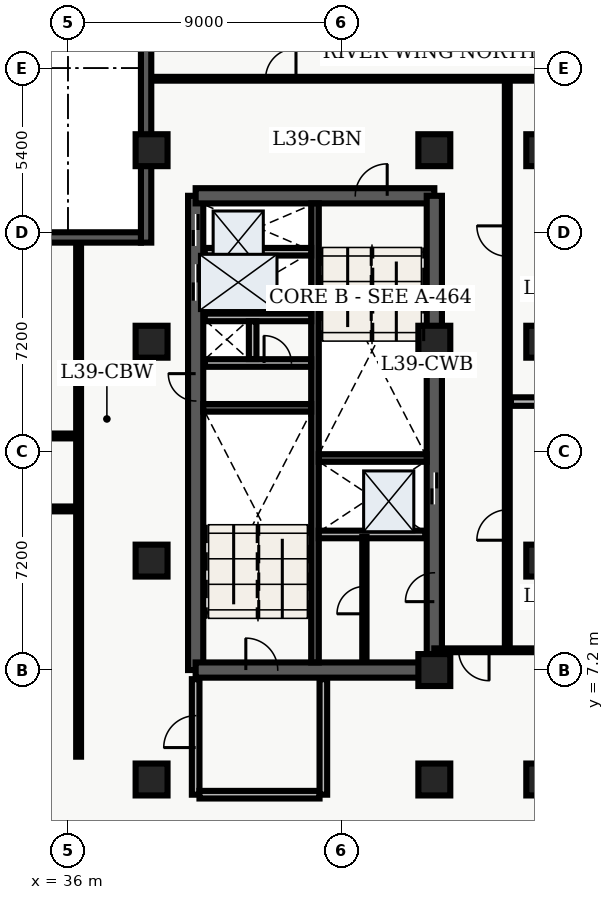
"""IFC4 building model, lengths in metres.
Left out: names, types, materials, properties, quantities, classifications, styles, units other than length and angle.
Written with IfcOpenShell. Run it as: python <this file> out.ifc"""

import sys

from ifc_helpers import new_model, entity, si_unit, converted_unit, direction, frame, origin_with_axes, origin_2d_with_axis, place, context, subcontext, project, spatial, polyline, rectangle, outline, extrude, element, fill, save


model = new_model("IFC4")
c1 = context("Model", 3, precision=1e-05, world=origin_with_axes(), true_north=direction((0.0, 1.0)))
c2 = subcontext(c1, "Body", "Model", "MODEL_VIEW")
j1 = project(units=[si_unit("LENGTHUNIT", "METRE"), converted_unit("PLANEANGLEUNIT", "DEGREE", entity("IfcPlaneAngleMeasure", 0.017), si_unit("PLANEANGLEUNIT", "RADIAN"), dimensions=[0, 0, 0, 0, 0, 0, 0])], contexts=[c1])
p1 = place(None, origin_with_axes())
s1 = spatial("IfcSite", under=j1, at=p1, CompositionType="ELEMENT")
p2 = place(p1, origin_with_axes())
s2 = spatial("IfcBuilding", under=s1, at=p2, CompositionType="ELEMENT")
p3 = place(p2, frame((0.0, 0.0, 160.2), z_axis=(0.0, 0.0, 1.0), x_axis=(1.0, 0.0, 0.0)))
s3 = spatial("IfcBuildingStorey", under=s2, at=p3, CompositionType="ELEMENT", Elevation=160.2)
p4 = place(p3, frame((40.2, 7.2, 0.0), z_axis=(0.0, 0.0, 1.0), x_axis=(0.0, 1.0, 0.0)))
e1 = element("IfcWall", 1, at=p4, inside=s3, PredefinedType="SHEAR", context=c2, shape_type="SweptSolid", body=[
    extrude(outline(polyline([(0.0, -0.25), (15.6, -0.25), (15.6, 0.25), (0.0, 0.25), (0.0, -0.25)])), origin_with_axes(), (0.0, 0.0, 1.0), 3.66),
])
p5 = place(p4, frame((14.475, 0.0, 0.0), z_axis=(0.0, 0.0, 1.0), x_axis=(1.0, 0.0, 0.0)))
e2 = element("IfcOpeningElement", 2, at=p5, cuts=e1, PredefinedType="OPENING", context=c2, shape_type="SweptSolid", body=[
    extrude(rectangle(XDim=1.05, YDim=0.52, at=origin_2d_with_axis()), origin_with_axes(), (0.0, 0.0, 1.0), 2.15),
])
p6 = place(p4, frame((12.75, 0.0, 0.0), z_axis=(0.0, 0.0, 1.0), x_axis=(1.0, 0.0, 0.0)))
e3 = element("IfcOpeningElement", 3, at=p6, cuts=e1, PredefinedType="OPENING", context=c2, shape_type="SweptSolid", body=[
    extrude(rectangle(XDim=1.2, YDim=0.52, at=origin_2d_with_axis()), origin_with_axes(), (0.0, 0.0, 1.0), 2.15),
])
p7 = place(p4, frame((9.3, 0.0, 0.0), z_axis=(0.0, 0.0, 1.0), x_axis=(1.0, 0.0, 0.0)))
e4 = element("IfcOpeningElement", 4, at=p7, cuts=e1, PredefinedType="OPENING", context=c2, shape_type="SweptSolid", body=[
    extrude(rectangle(XDim=0.9, YDim=0.52, at=origin_2d_with_axis()), origin_with_axes(), (0.0, 0.0, 1.0), 2.15),
])
p8 = place(p3, frame((40.2, 7.2, 0.0), z_axis=(0.0, 0.0, 1.0), x_axis=(1.0, 0.0, 0.0)))
e5 = element("IfcWall", 5, at=p8, inside=s3, PredefinedType="SHEAR", context=c2, shape_type="SweptSolid", body=[
    extrude(outline(polyline([(0.0, -0.25), (7.85, -0.25), (7.85, 0.25), (0.0, 0.25), (0.0, -0.25)])), origin_with_axes(), (0.0, 0.0, 1.0), 3.66),
])
p9 = place(p8, frame((2.175, 0.0, 0.0), z_axis=(0.0, 0.0, 1.0), x_axis=(1.0, 0.0, 0.0)))
e6 = element("IfcOpeningElement", 6, at=p9, cuts=e5, PredefinedType="OPENING", context=c2, shape_type="SweptSolid", body=[
    extrude(rectangle(XDim=1.05, YDim=0.52, at=origin_2d_with_axis()), origin_with_axes(), (0.0, 0.0, 1.0), 2.15),
])
p10 = place(p3, frame((40.2, 22.8, 0.0), z_axis=(0.0, 0.0, 1.0), x_axis=(1.0, 0.0, 0.0)))
e7 = element("IfcWall", 7, at=p10, inside=s3, PredefinedType="SHEAR", context=c2, shape_type="SweptSolid", body=[
    extrude(outline(polyline([(0.0, -0.25), (7.85, -0.25), (7.85, 0.25), (0.0, 0.25), (0.0, -0.25)])), origin_with_axes(), (0.0, 0.0, 1.0), 3.66),
])
p11 = place(p10, frame((5.775, 0.0, 0.0), z_axis=(0.0, 0.0, 1.0), x_axis=(1.0, 0.0, 0.0)))
e8 = element("IfcOpeningElement", 8, at=p11, cuts=e7, PredefinedType="OPENING", context=c2, shape_type="SweptSolid", body=[
    extrude(rectangle(XDim=1.05, YDim=0.52, at=origin_2d_with_axis()), origin_with_axes(), (0.0, 0.0, 1.0), 2.15),
])
p12 = place(p3, frame((48.05, 7.2, 0.0), z_axis=(0.0, 0.0, 1.0), x_axis=(0.0, 1.0, 0.0)))
e9 = element("IfcWall", 9, at=p12, inside=s3, PredefinedType="SHEAR", context=c2, shape_type="SweptSolid", body=[
    extrude(outline(polyline([(0.0, -0.25), (15.6, -0.25), (15.6, 0.25), (0.0, 0.25), (0.0, -0.25)])), origin_with_axes(), (0.0, 0.0, 1.0), 3.66),
])
p13 = place(p12, frame((5.975, 0.0, 0.0), z_axis=(0.0, 0.0, 1.0), x_axis=(1.0, 0.0, 0.0)))
e10 = element("IfcOpeningElement", 10, at=p13, cuts=e9, PredefinedType="OPENING", context=c2, shape_type="SweptSolid", body=[
    extrude(rectangle(XDim=1.05, YDim=0.52, at=origin_2d_with_axis()), origin_with_axes(), (0.0, 0.0, 1.0), 2.15),
])
p14 = place(p12, frame((2.725, 0.0, 0.0), z_axis=(0.0, 0.0, 1.0), x_axis=(1.0, 0.0, 0.0)))
e11 = element("IfcOpeningElement", 11, at=p14, cuts=e9, PredefinedType="OPENING", context=c2, shape_type="SweptSolid", body=[
    extrude(rectangle(XDim=0.95, YDim=0.52, at=origin_2d_with_axis()), origin_with_axes(), (0.0, 0.0, 1.0), 2.15),
])
p15 = place(p3, frame((44.125, 7.45, 0.0), z_axis=(0.0, 0.0, 1.0), x_axis=(0.0, 1.0, 0.0)))
e12 = element("IfcWall", 12, at=p15, inside=s3, PredefinedType="SHEAR", context=c2, shape_type="SweptSolid", body=[
    extrude(outline(polyline([(0.0, -0.125), (15.1, -0.125), (15.1, 0.125), (0.0, 0.125), (0.0, -0.125)])), origin_with_axes(), (0.0, 0.0, 1.0), 3.66),
])
for number, where, z_axis, x_axis in (
    (13, (40.45, 15.825, 0.0), (0.0, 0.0, 1.0), (1.0, 0.0, 0.0)),
    (14, (44.25, 14.175, 0.0), (0.0, 0.0, 1.0), (1.0, 0.0, 0.0)),
):
    element("IfcWall", number, at=place(p3, frame(where, z_axis=z_axis, x_axis=x_axis)), inside=s3, PredefinedType="SHEAR", context=c2, shape_type="SweptSolid", body=[
        extrude(outline(polyline([(0.0, -0.125), (3.55, -0.125), (3.55, 0.125), (0.0, 0.125), (0.0, -0.125)])), origin_with_axes(), (0.0, 0.0, 1.0), 3.66),
    ])
p16 = place(p3, frame((40.5, 17.3, 0.0), z_axis=(0.0, 0.0, 1.0), x_axis=(1.0, 0.0, 0.0)))
e15 = element("IfcWall", 15, at=p16, inside=s3, PredefinedType="SOLIDWALL", context=c2, shape_type="SweptSolid", body=[
    extrude(outline(polyline([(0.0, -0.125), (3.5, -0.125), (3.5, 0.125), (0.0, 0.125), (0.0, -0.125)])), origin_with_axes(), (0.0, 0.0, 1.0), 2.7),
])
p17 = place(p16, frame((2.4, 0.0, 0.0), z_axis=(0.0, 0.0, 1.0), x_axis=(1.0, 0.0, 0.0)))
e16 = element("IfcOpeningElement", 16, at=p17, cuts=e15, PredefinedType="OPENING", context=c2, shape_type="SweptSolid", body=[
    extrude(rectangle(XDim=0.9, YDim=0.27, at=origin_2d_with_axis()), origin_with_axes(), (0.0, 0.0, 1.0), 2.15),
])
p18 = place(p3, frame((40.5, 18.8, 0.0), z_axis=(0.0, 0.0, 1.0), x_axis=(1.0, 0.0, 0.0)))
e17 = element("IfcWall", 17, at=p18, inside=s3, PredefinedType="SOLIDWALL", context=c2, shape_type="SweptSolid", body=[
    extrude(outline(polyline([(0.0, -0.125), (3.5, -0.125), (3.5, 0.125), (0.0, 0.125), (0.0, -0.125)])), origin_with_axes(), (0.0, 0.0, 1.0), 2.7),
])
p19 = place(p3, frame((42.075, 17.43, 0.0), z_axis=(0.0, 0.0, 1.0), x_axis=(0.0, 1.0, 0.0)))
e18 = element("IfcWall", 18, at=p19, inside=s3, PredefinedType="SOLIDWALL", context=c2, shape_type="SweptSolid", body=[
    extrude(outline(polyline([(0.0, -0.125), (1.24, -0.125), (1.24, 0.125), (0.0, 0.125), (0.0, -0.125)])), origin_with_axes(), (0.0, 0.0, 1.0), 2.7),
])
p20 = place(p3, frame((40.2, 3.1, 0.0), z_axis=(0.0, 0.0, 1.0), x_axis=(0.0, 1.0, 0.0)))
e19 = element("IfcWall", 19, at=p20, inside=s3, PredefinedType="SOLIDWALL", context=c2, shape_type="SweptSolid", body=[
    extrude(outline(polyline([(0.0, -0.125), (3.8, -0.125), (3.8, 0.125), (0.0, 0.125), (0.0, -0.125)])), origin_with_axes(), (0.0, 0.0, 1.0), 2.7),
])
p21 = place(p20, frame((2.075, 0.0, 0.0), z_axis=(0.0, 0.0, 1.0), x_axis=(1.0, 0.0, 0.0)))
e20 = element("IfcOpeningElement", 20, at=p21, cuts=e19, PredefinedType="OPENING", context=c2, shape_type="SweptSolid", body=[
    extrude(rectangle(XDim=1.05, YDim=0.27, at=origin_2d_with_axis()), origin_with_axes(), (0.0, 0.0, 1.0), 2.15),
])
p22 = place(p3, frame((40.325, 3.1, 0.0), z_axis=(0.0, 0.0, 1.0), x_axis=(1.0, 0.0, 0.0)))
e21 = element("IfcWall", 21, at=p22, inside=s3, PredefinedType="SOLIDWALL", context=c2, shape_type="SweptSolid", body=[
    extrude(outline(polyline([(0.0, -0.125), (3.95, -0.125), (3.95, 0.125), (0.0, 0.125), (0.0, -0.125)])), origin_with_axes(), (0.0, 0.0, 1.0), 2.7),
])
p23 = place(p3, frame((44.4, 3.1, 0.0), z_axis=(0.0, 0.0, 1.0), x_axis=(0.0, 1.0, 0.0)))
e22 = element("IfcWall", 22, at=p23, inside=s3, PredefinedType="SOLIDWALL", context=c2, shape_type="SweptSolid", body=[
    extrude(outline(polyline([(0.0, -0.125), (3.8, -0.125), (3.8, 0.125), (0.0, 0.125), (0.0, -0.125)])), origin_with_axes(), (0.0, 0.0, 1.0), 2.7),
])
for number, where, z_axis, x_axis in (
    (23, (38.75, 3.6, 0.0), (0.0, 0.0, 1.0), (1.0, 0.0, 0.0)),
    (24, (38.75, 10.8, 0.0), (0.0, 0.0, 1.0), (1.0, 0.0, 0.0)),
    (25, (38.75, 18.0, 0.0), (0.0, 0.0, 1.0), (1.0, 0.0, 0.0)),
    (26, (38.75, 24.3, 0.0), (0.0, 0.0, 1.0), (1.0, 0.0, 0.0)),
    (27, (48.05, 3.6, 0.0), (0.0, 0.0, 1.0), (1.0, 0.0, 0.0)),
    (28, (48.05, 7.2, 0.0), (0.0, 0.0, 1.0), (1.0, 0.0, 0.0)),
    (29, (48.05, 18.0, 0.0), (0.0, 0.0, 1.0), (1.0, 0.0, 0.0)),
    (30, (48.05, 24.3, 0.0), (0.0, 0.0, 1.0), (1.0, 0.0, 0.0)),
    (31, (51.6, 3.6, 0.0), (0.0, 0.0, 1.0), (1.0, 0.0, 0.0)),
    (32, (51.6, 10.8, 0.0), (0.0, 0.0, 1.0), (1.0, 0.0, 0.0)),
    (33, (51.6, 18.0, 0.0), (0.0, 0.0, 1.0), (1.0, 0.0, 0.0)),
    (34, (51.6, 24.3, 0.0), (0.0, 0.0, 1.0), (1.0, 0.0, 0.0)),
):
    element("IfcColumn", number, at=place(p3, frame(where, z_axis=z_axis, x_axis=x_axis)), inside=s3, PredefinedType="COLUMN", context=c2, shape_type="SweptSolid", body=[
        extrude(rectangle(XDim=1.05, YDim=1.05, at=origin_2d_with_axis()), origin_with_axes(), (0.0, 0.0, 1.0), 3.9),
    ])
for number, where, z_axis, x_axis in (
    (35, (40.5, 20.96, 0.0), (0.0, 0.0, 1.0), (1.0, 0.0, 0.0)),
    (36, (44.25, 11.66, 0.0), (0.0, 0.0, 1.0), (1.0, 0.0, 0.0)),
):
    element("IfcWall", number, at=place(p3, frame(where, z_axis=z_axis, x_axis=x_axis)), inside=s3, PredefinedType="SOLIDWALL", context=c2, shape_type="SweptSolid", body=[
        extrude(outline(polyline([(0.0, -0.125), (3.5, -0.125), (3.5, 0.125), (0.0, 0.125), (0.0, -0.125)])), origin_with_axes(), (0.0, 0.0, 1.0), 2.7),
    ])
p24 = place(p3, frame((45.75, 7.5, 0.0), z_axis=(0.0, 0.0, 1.0), x_axis=(0.0, 1.0, 0.0)))
e37 = element("IfcWall", 37, at=p24, inside=s3, PredefinedType="PARTITIONING", context=c2, shape_type="SweptSolid", body=[
    extrude(outline(polyline([(0.0, -0.07), (4.08, -0.07), (4.08, 0.07), (0.0, 0.07), (0.0, -0.07)])), origin_with_axes(), (0.0, 0.0, 1.0), 2.7),
])
p25 = place(p24, frame((2.0, 0.0, 0.0), z_axis=(0.0, 0.0, 1.0), x_axis=(1.0, 0.0, 0.0)))
e38 = element("IfcOpeningElement", 38, at=p25, cuts=e37, PredefinedType="OPENING", context=c2, shape_type="SweptSolid", body=[
    extrude(rectangle(XDim=0.9, YDim=0.16, at=origin_2d_with_axis()), origin_with_axes(), (0.0, 0.0, 1.0), 2.15),
])
p26 = place(p3, frame((21.15, 12.5, 0.0), z_axis=(0.0, 0.0, 1.0), x_axis=(1.0, 0.0, 0.0)))
e39 = element("IfcWall", 39, at=p26, inside=s3, PredefinedType="PARTITIONING", context=c2, shape_type="SweptSolid", body=[
    extrude(outline(polyline([(0.0, -0.08), (15.2, -0.08), (15.2, 0.08), (0.0, 0.08), (0.0, -0.08)])), origin_with_axes(), (0.0, 0.0, 1.0), 2.7),
])
p27 = place(p26, frame((3.468, 0.0, 0.0), z_axis=(0.0, 0.0, 1.0), x_axis=(1.0, 0.0, 0.0)))
e40 = element("IfcOpeningElement", 40, at=p27, cuts=e39, PredefinedType="OPENING", context=c2, shape_type="SweptSolid", body=[
    extrude(rectangle(XDim=1.0, YDim=0.18, at=origin_2d_with_axis()), origin_with_axes(), (0.0, 0.0, 1.0), 2.15),
])
p28 = place(p26, frame((10.938, 0.0, 0.0), z_axis=(0.0, 0.0, 1.0), x_axis=(1.0, 0.0, 0.0)))
e41 = element("IfcOpeningElement", 41, at=p28, cuts=e39, PredefinedType="OPENING", context=c2, shape_type="SweptSolid", body=[
    extrude(rectangle(XDim=1.2, YDim=0.18, at=origin_2d_with_axis()), origin_with_axes(), (0.0, 0.0, 1.0), 2.2),
])
p29 = place(p3, frame((21.15, 14.9, 0.0), z_axis=(0.0, 0.0, 1.0), x_axis=(1.0, 0.0, 0.0)))
e42 = element("IfcWall", 42, at=p29, inside=s3, PredefinedType="PARTITIONING", context=c2, shape_type="SweptSolid", body=[
    extrude(outline(polyline([(0.0, -0.08), (15.2, -0.08), (15.2, 0.08), (0.0, 0.08), (0.0, -0.08)])), origin_with_axes(), (0.0, 0.0, 1.0), 2.7),
])
p30 = place(p29, frame((1.942, 0.0, 0.0), z_axis=(0.0, 0.0, 1.0), x_axis=(1.0, 0.0, 0.0)))
e43 = element("IfcOpeningElement", 43, at=p30, cuts=e42, PredefinedType="OPENING", context=c2, shape_type="SweptSolid", body=[
    extrude(rectangle(XDim=1.0, YDim=0.18, at=origin_2d_with_axis()), origin_with_axes(), (0.0, 0.0, 1.0), 2.15),
])
p31 = place(p29, frame((5.077, 0.0, 0.0), z_axis=(0.0, 0.0, 1.0), x_axis=(1.0, 0.0, 0.0)))
e44 = element("IfcOpeningElement", 44, at=p31, cuts=e42, PredefinedType="OPENING", context=c2, shape_type="SweptSolid", body=[
    extrude(rectangle(XDim=1.0, YDim=0.18, at=origin_2d_with_axis()), origin_with_axes(), (0.0, 0.0, 1.0), 2.15),
])
p32 = place(p29, frame((9.281, 0.0, 0.0), z_axis=(0.0, 0.0, 1.0), x_axis=(1.0, 0.0, 0.0)))
e45 = element("IfcOpeningElement", 45, at=p32, cuts=e42, PredefinedType="OPENING", context=c2, shape_type="SweptSolid", body=[
    extrude(rectangle(XDim=1.0, YDim=0.18, at=origin_2d_with_axis()), origin_with_axes(), (0.0, 0.0, 1.0), 2.15),
])
p33 = place(p29, frame((13.617, 0.0, 0.0), z_axis=(0.0, 0.0, 1.0), x_axis=(1.0, 0.0, 0.0)))
e46 = element("IfcOpeningElement", 46, at=p33, cuts=e42, PredefinedType="OPENING", context=c2, shape_type="SweptSolid", body=[
    extrude(rectangle(XDim=1.0, YDim=0.18, at=origin_2d_with_axis()), origin_with_axes(), (0.0, 0.0, 1.0), 2.15),
])
p34 = place(p3, frame((36.35, 4.35, 0.0), z_axis=(0.0, 0.0, 1.0), x_axis=(0.0, 1.0, 0.0)))
e47 = element("IfcWall", 47, at=p34, inside=s3, PredefinedType="PARTITIONING", context=c2, shape_type="SweptSolid", body=[
    extrude(outline(polyline([(0.0, -0.08), (16.95, -0.08), (16.95, 0.08), (0.0, 0.08), (0.0, -0.08)])), origin_with_axes(), (0.0, 0.0, 1.0), 2.7),
])
p35 = place(p3, frame((50.45, 7.85, 0.0), z_axis=(0.0, 0.0, 1.0), x_axis=(0.0, 1.0, 0.0)))
e48 = element("IfcWall", 48, at=p35, inside=s3, PredefinedType="PARTITIONING", context=c2, shape_type="SweptSolid", body=[
    extrude(outline(polyline([(0.0, -0.08), (18.8, -0.08), (18.8, 0.08), (0.0, 0.08), (0.0, -0.08)])), origin_with_axes(), (0.0, 0.0, 1.0), 2.7),
])
p36 = place(p35, frame((4.12, 0.0, 0.0), z_axis=(0.0, 0.0, 1.0), x_axis=(1.0, 0.0, 0.0)))
e49 = element("IfcOpeningElement", 49, at=p36, cuts=e48, PredefinedType="OPENING", context=c2, shape_type="SweptSolid", body=[
    extrude(rectangle(XDim=1.0, YDim=0.18, at=origin_2d_with_axis()), origin_with_axes(), (0.0, 0.0, 1.0), 2.15),
])
p37 = place(p35, frame((13.46, 0.0, 0.0), z_axis=(0.0, 0.0, 1.0), x_axis=(1.0, 0.0, 0.0)))
e50 = element("IfcOpeningElement", 50, at=p37, cuts=e48, PredefinedType="OPENING", context=c2, shape_type="SweptSolid", body=[
    extrude(rectangle(XDim=1.0, YDim=0.18, at=origin_2d_with_axis()), origin_with_axes(), (0.0, 0.0, 1.0), 2.15),
])
p38 = place(p3, frame((59.665, 7.85, 0.0), z_axis=(0.0, 0.0, 1.0), x_axis=(-1.0, 0.0, 0.0)))
e51 = element("IfcWall", 51, at=p38, inside=s3, PredefinedType="PARTITIONING", context=c2, shape_type="SweptSolid", body=[
    extrude(outline(polyline([(0.0, -0.062), (11.615, -0.062), (11.615, 0.062), (0.0, 0.062), (0.0, -0.062)])), origin_with_axes(), (0.0, 0.0, 1.0), 2.7),
])
p39 = place(p38, frame((10.315, 0.0, 0.0), z_axis=(0.0, 0.0, 1.0), x_axis=(1.0, 0.0, 0.0)))
e52 = element("IfcOpeningElement", 52, at=p39, cuts=e51, PredefinedType="OPENING", context=c2, shape_type="SweptSolid", body=[
    extrude(rectangle(XDim=1.0, YDim=0.145, at=origin_2d_with_axis()), origin_with_axes(), (0.0, 0.0, 1.0), 2.15),
])
p40 = place(p3, frame((38.735, 26.65, 0.0), z_axis=(0.0, 0.0, 1.0), x_axis=(1.0, 0.0, 0.0)))
e53 = element("IfcWall", 53, at=p40, inside=s3, PredefinedType="PARTITIONING", context=c2, shape_type="SweptSolid", body=[
    extrude(outline(polyline([(0.0, -0.062), (20.905, -0.062), (20.905, 0.062), (0.0, 0.062), (0.0, -0.062)])), origin_with_axes(), (0.0, 0.0, 1.0), 2.7),
])
p41 = place(p40, frame((4.265, 0.0, 0.0), z_axis=(0.0, 0.0, 1.0), x_axis=(1.0, 0.0, 0.0)))
e54 = element("IfcOpeningElement", 54, at=p41, cuts=e53, PredefinedType="OPENING", context=c2, shape_type="SweptSolid", body=[
    extrude(rectangle(XDim=1.0, YDim=0.145, at=origin_2d_with_axis()), origin_with_axes(), (0.0, 0.0, 1.0), 2.15),
])
p42 = place(p3, frame((50.57, 16.031, 0.0), z_axis=(0.0, 0.0, 1.0), x_axis=(1.0, 0.0, 0.0)))
e55 = element("IfcWall", 55, at=p42, inside=s3, PredefinedType="PARTITIONING", context=c2, shape_type="SweptSolid", body=[
    extrude(outline(polyline([(0.0, -0.14), (9.095, -0.14), (9.095, 0.14), (0.0, 0.14), (0.0, -0.14)])), origin_with_axes(), (0.0, 0.0, 1.0), 2.7),
])
p43 = place(p3, frame((38.57, 21.26, 0.0), z_axis=(0.0, 0.0, 1.0), x_axis=(0.0, 1.0, 0.0)))
e56 = element("IfcWall", 56, at=p43, inside=s3, PredefinedType="SOLIDWALL", context=c2, shape_type="SweptSolid", body=[
    extrude(outline(polyline([(0.0, -0.17), (7.54, -0.17), (7.54, 0.17), (0.0, 0.17), (0.0, -0.17)])), origin_with_axes(), (0.0, 0.0, 1.0), 3.66),
])
p44 = place(p3, frame((23.076, 21.43, 0.0), z_axis=(0.0, 0.0, 1.0), x_axis=(1.0, 0.0, 0.0)))
e57 = element("IfcWall", 57, at=p44, inside=s3, PredefinedType="SOLIDWALL", context=c2, shape_type="SweptSolid", body=[
    extrude(outline(polyline([(0.0, -0.17), (15.324, -0.17), (15.324, 0.17), (0.0, 0.17), (0.0, -0.17)])), origin_with_axes(), (0.0, 0.0, 1.0), 3.66),
])
p45 = place(p44, frame((7.662, 0.0, 0.45), z_axis=(0.0, 0.0, 1.0), x_axis=(1.0, 0.0, 0.0)))
e58 = element("IfcOpeningElement", 58, at=p45, cuts=e57, PredefinedType="OPENING", context=c2, shape_type="SweptSolid", body=[
    extrude(rectangle(XDim=1.8, YDim=0.36, at=origin_2d_with_axis()), origin_with_axes(), (0.0, 0.0, 1.0), 2.1),
])
p46 = place(p12, frame((5.975, 0.0, 0.0), z_axis=(0.0, 0.0, 1.0), x_axis=(1.0, 0.0, 0.0)))
e59 = element("IfcDoor", 59, at=p46, inside=s3, OperationType="SLIDING_TO_LEFT", PredefinedType="DOOR", context=c2, shape_type="SweptSolid", body=[
    extrude(rectangle(XDim=1.05, YDim=0.09, at=origin_2d_with_axis()), origin_with_axes(), (0.0, 0.0, 1.0), 2.15),
])
fill(e10, e59)
p47 = place(p4, frame((14.475, 0.0, 0.0), z_axis=(0.0, 0.0, 1.0), x_axis=(1.0, 0.0, 0.0)))
e60 = element("IfcDoor", 60, at=p47, inside=s3, OperationType="SLIDING_TO_RIGHT", PredefinedType="DOOR", context=c2, shape_type="SweptSolid", body=[
    extrude(rectangle(XDim=1.05, YDim=0.09, at=origin_2d_with_axis()), origin_with_axes(), (0.0, 0.0, 1.0), 2.15),
])
fill(e2, e60)
p48 = place(p4, frame((12.75, 0.0, 0.0), z_axis=(0.0, 0.0, 1.0), x_axis=(1.0, 0.0, 0.0)))
e61 = element("IfcDoor", 61, at=p48, inside=s3, OperationType="DOUBLE_DOOR_SLIDING", PredefinedType="DOOR", context=c2, shape_type="SweptSolid", body=[
    extrude(rectangle(XDim=1.2, YDim=0.09, at=origin_2d_with_axis()), origin_with_axes(), (0.0, 0.0, 1.0), 2.15),
])
fill(e3, e61)
p49 = place(p4, frame((9.3, 0.0, 0.0), z_axis=(0.0, 0.0, 1.0), x_axis=(1.0, 0.0, 0.0)))
e62 = element("IfcDoor", 62, at=p49, inside=s3, OperationType="SINGLE_SWING_RIGHT", PredefinedType="DOOR", context=c2, shape_type="SweptSolid", body=[
    extrude(rectangle(XDim=0.9, YDim=0.09, at=origin_2d_with_axis()), origin_with_axes(), (0.0, 0.0, 1.0), 2.15),
])
fill(e4, e62)
p50 = place(p16, frame((2.4, 0.0, 0.0), z_axis=(0.0, 0.0, 1.0), x_axis=(1.0, 0.0, 0.0)))
e63 = element("IfcDoor", 63, at=p50, inside=s3, OperationType="SINGLE_SWING_LEFT", PredefinedType="DOOR", context=c2, shape_type="SweptSolid", body=[
    extrude(rectangle(XDim=0.9, YDim=0.09, at=origin_2d_with_axis()), origin_with_axes(), (0.0, 0.0, 1.0), 2.15),
])
fill(e16, e63)
p51 = place(p8, frame((2.175, 0.0, 0.0), z_axis=(0.0, 0.0, 1.0), x_axis=(1.0, 0.0, 0.0)))
e64 = element("IfcDoor", 64, at=p51, inside=s3, OperationType="SINGLE_SWING_LEFT", PredefinedType="DOOR", context=c2, shape_type="SweptSolid", body=[
    extrude(rectangle(XDim=1.05, YDim=0.09, at=origin_2d_with_axis()), origin_with_axes(), (0.0, 0.0, 1.0), 2.15),
])
fill(e6, e64)
p52 = place(p10, frame((5.775, 0.0, 0.0), z_axis=(0.0, 0.0, 1.0), x_axis=(1.0, 0.0, 0.0)))
e65 = element("IfcDoor", 65, at=p52, inside=s3, OperationType="SINGLE_SWING_RIGHT", PredefinedType="DOOR", context=c2, shape_type="SweptSolid", body=[
    extrude(rectangle(XDim=1.05, YDim=0.09, at=origin_2d_with_axis()), origin_with_axes(), (0.0, 0.0, 1.0), 2.15),
])
fill(e8, e65)
p53 = place(p20, frame((2.075, 0.0, 0.0), z_axis=(0.0, 0.0, 1.0), x_axis=(1.0, 0.0, 0.0)))
e66 = element("IfcDoor", 66, at=p53, inside=s3, OperationType="SINGLE_SWING_LEFT", PredefinedType="DOOR", context=c2, shape_type="SweptSolid", body=[
    extrude(rectangle(XDim=1.05, YDim=0.09, at=origin_2d_with_axis()), origin_with_axes(), (0.0, 0.0, 1.0), 2.15),
])
fill(e20, e66)
p54 = place(p24, frame((2.0, 0.0, 0.0), z_axis=(0.0, 0.0, 1.0), x_axis=(1.0, 0.0, 0.0)))
e67 = element("IfcDoor", 67, at=p54, inside=s3, OperationType="SINGLE_SWING_LEFT", PredefinedType="DOOR", context=c2, shape_type="SweptSolid", body=[
    extrude(rectangle(XDim=0.9, YDim=0.084, at=origin_2d_with_axis()), origin_with_axes(), (0.0, 0.0, 1.0), 2.15),
])
fill(e38, e67)
p55 = place(p12, frame((2.725, 0.0, 0.0), z_axis=(0.0, 0.0, 1.0), x_axis=(1.0, 0.0, 0.0)))
e68 = element("IfcDoor", 68, at=p55, inside=s3, OperationType="SINGLE_SWING_LEFT", PredefinedType="DOOR", context=c2, shape_type="SweptSolid", body=[
    extrude(rectangle(XDim=0.95, YDim=0.09, at=origin_2d_with_axis()), origin_with_axes(), (0.0, 0.0, 1.0), 2.15),
])
fill(e11, e68)
p56 = place(p38, frame((10.315, 0.0, 0.0), z_axis=(0.0, 0.0, 1.0), x_axis=(1.0, 0.0, 0.0)))
e69 = element("IfcDoor", 69, at=p56, inside=s3, OperationType="SINGLE_SWING_LEFT", PredefinedType="DOOR", context=c2, shape_type="SweptSolid", body=[
    extrude(rectangle(XDim=1.0, YDim=0.075, at=origin_2d_with_axis()), origin_with_axes(), (0.0, 0.0, 1.0), 2.15),
])
fill(e52, e69)
p57 = place(p40, frame((4.265, 0.0, 0.0), z_axis=(0.0, 0.0, 1.0), x_axis=(1.0, 0.0, 0.0)))
e70 = element("IfcDoor", 70, at=p57, inside=s3, OperationType="SINGLE_SWING_RIGHT", PredefinedType="DOOR", context=c2, shape_type="SweptSolid", body=[
    extrude(rectangle(XDim=1.0, YDim=0.075, at=origin_2d_with_axis()), origin_with_axes(), (0.0, 0.0, 1.0), 2.15),
])
fill(e54, e70)
p58 = place(p35, frame((4.12, 0.0, 0.0), z_axis=(0.0, 0.0, 1.0), x_axis=(1.0, 0.0, 0.0)))
e71 = element("IfcDoor", 71, at=p58, inside=s3, OperationType="SINGLE_SWING_LEFT", PredefinedType="DOOR", context=c2, shape_type="SweptSolid", body=[
    extrude(rectangle(XDim=1.0, YDim=0.09, at=origin_2d_with_axis()), origin_with_axes(), (0.0, 0.0, 1.0), 2.15),
])
fill(e49, e71)
p59 = place(p35, frame((13.46, 0.0, 0.0), z_axis=(0.0, 0.0, 1.0), x_axis=(1.0, 0.0, 0.0)))
e72 = element("IfcDoor", 72, at=p59, inside=s3, OperationType="SINGLE_SWING_RIGHT", PredefinedType="DOOR", context=c2, shape_type="SweptSolid", body=[
    extrude(rectangle(XDim=1.0, YDim=0.09, at=origin_2d_with_axis()), origin_with_axes(), (0.0, 0.0, 1.0), 2.15),
])
fill(e50, e72)
save(model, sys.argv[1])
